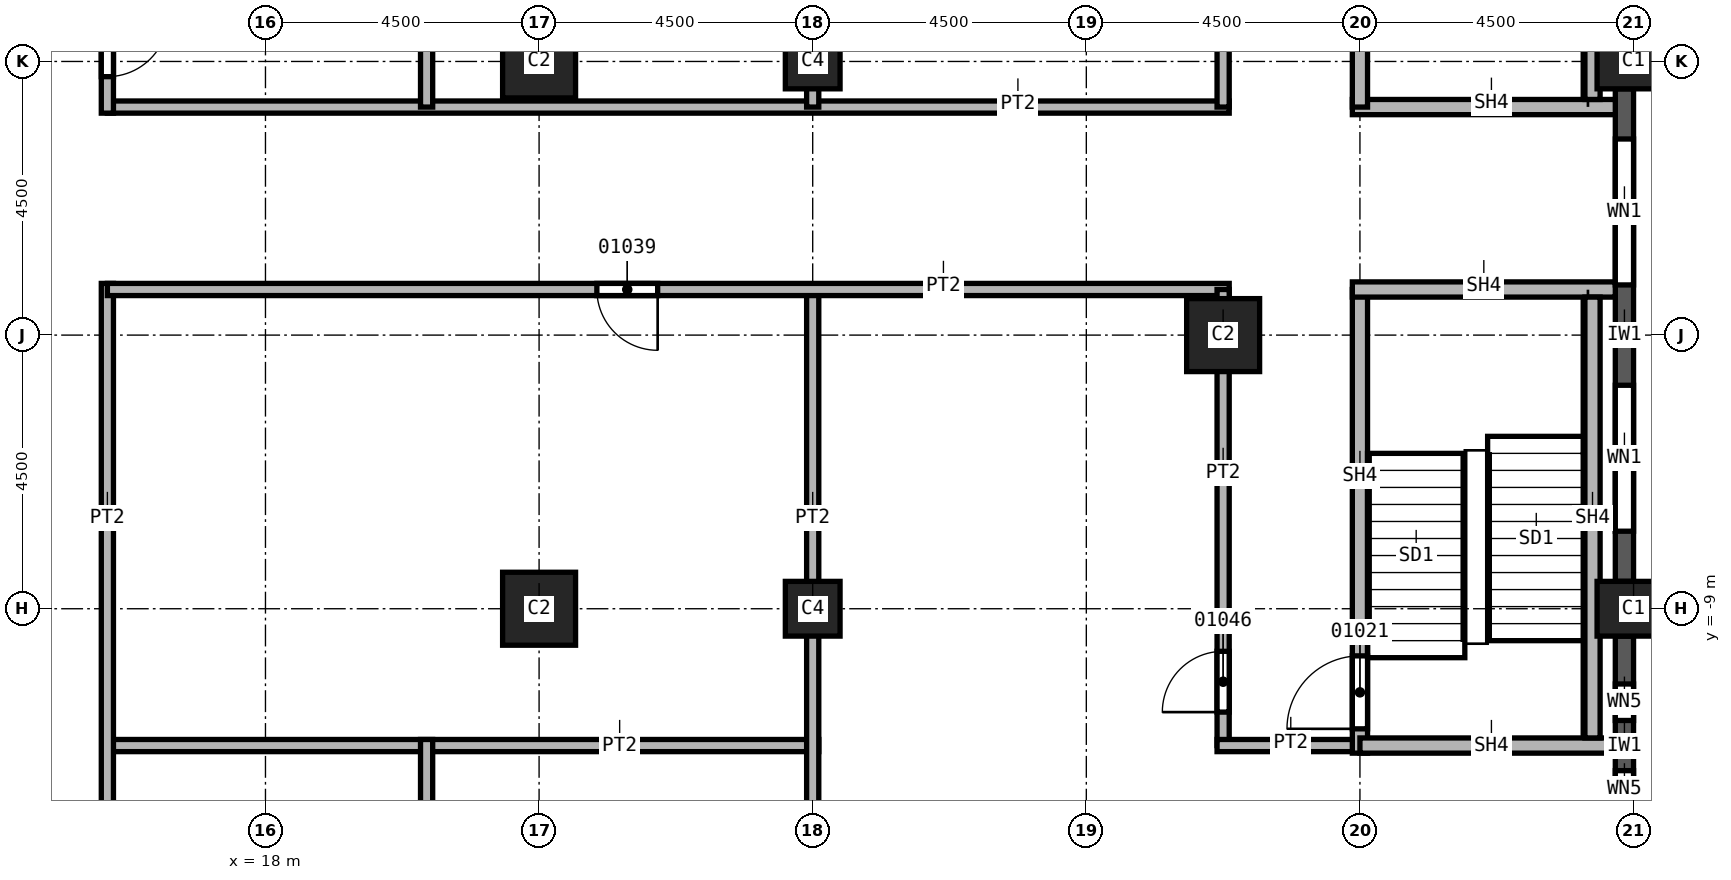
"""IFC4 building model, lengths in metres.
Left out: names, types, materials, properties, quantities, classifications, styles, units other than length and angle.
Written with IfcOpenShell. Run it as: python <this file> out.ifc"""

import sys

from ifc_helpers import new_model, si_unit, direction, frame, frame_2d, origin, origin_2d, place, context, subcontext, project, spatial, rectangle, extrude, element, fill, save


model = new_model("IFC4")
c1 = context("Model", 3, precision=1e-05, world=origin(), true_north=direction((0.0, 1.0)))
c2 = subcontext(c1, "Body", "Model", "MODEL_VIEW")
j1 = project(units=[si_unit("LENGTHUNIT", "METRE"), si_unit("PLANEANGLEUNIT", "RADIAN")], contexts=[c1])
p1 = place(None, origin())
s1 = spatial("IfcSite", under=j1, at=p1, CompositionType="ELEMENT")
p2 = place(p1, origin())
s2 = spatial("IfcBuilding", under=s1, at=p2, CompositionType="ELEMENT")
p3 = place(p2, frame((0.0, 0.0, 68.0)))
s3 = spatial("IfcBuildingStorey", under=s2, at=p3, CompositionType="ELEMENT", Elevation=68.0)
for number, where, z_axis, x_axis in (
    (1, (40.5, 0.0, 0.0), (0.0, 0.0, 1.0), (0.0, 1.0, 0.0)),
    (2, (40.5, -9.0, 0.0), (0.0, 0.0, 1.0), (0.0, 1.0, 0.0)),
):
    element("IfcColumn", number, at=place(p3, frame(where, z_axis=z_axis, x_axis=x_axis)), inside=s3, PredefinedType="COLUMN", context=c2, shape_type="SweptSolid", body=[
        extrude(rectangle(XDim=0.9, YDim=1.2, at=origin_2d()), origin(), (0.0, 0.0, 1.0), 3.7),
    ])
for number, where, z_axis, x_axis in (
    (3, (33.75, -4.5, 0.0), (0.0, 0.0, 1.0), (1.0, 0.0, 0.0)),
    (4, (22.5, 0.0, 0.0), (0.0, 0.0, 1.0), (1.0, 0.0, 0.0)),
    (5, (22.5, -9.0, 0.0), (0.0, 0.0, 1.0), (1.0, 0.0, 0.0)),
):
    element("IfcColumn", number, at=place(p3, frame(where, z_axis=z_axis, x_axis=x_axis)), inside=s3, PredefinedType="COLUMN", context=c2, shape_type="SweptSolid", body=[
        extrude(rectangle(XDim=1.2, YDim=1.2, at=origin_2d()), origin(), (0.0, 0.0, 1.0), 3.7),
    ])
for number, where, z_axis, x_axis in (
    (6, (27.0, 0.0, 0.0), (0.0, 0.0, 1.0), (1.0, 0.0, 0.0)),
    (7, (27.0, -9.0, 0.0), (0.0, 0.0, 1.0), (1.0, 0.0, 0.0)),
):
    element("IfcColumn", number, at=place(p3, frame(where, z_axis=z_axis, x_axis=x_axis)), inside=s3, PredefinedType="COLUMN", context=c2, shape_type="SweptSolid", body=[
        extrude(rectangle(XDim=0.9, YDim=0.9, at=origin_2d()), origin(), (0.0, 0.0, 1.0), 3.7),
    ])
p4 = place(p3, frame((40.35, -13.05, 0.0), z_axis=(0.0, 0.0, 1.0), x_axis=(0.0, 1.0, 0.0)))
e8 = element("IfcWall", 8, at=p4, inside=s3, PredefinedType="SOLIDWALL", context=c2, shape_type="SweptSolid", body=[
    extrude(rectangle(XDim=3.6, YDim=0.3, at=frame_2d((1.8, 0.0))), origin(), (0.0, 0.0, 1.0), 3.1),
])
p5 = place(p4, frame((0.788, 0.0, 0.8)))
e9 = element("IfcOpeningElement", 9, at=p5, cuts=e8, PredefinedType="OPENING", context=c2, shape_type="SweptSolid", body=[
    extrude(rectangle(XDim=0.6, YDim=1.95, at=frame_2d((0.3, 0.975))), frame((0.0, 0.15, 0.0), z_axis=(0.0, -1.0, 0.0), x_axis=(1.0, 0.0, 0.0)), (0.0, 0.0, 1.0), 0.3),
])
p6 = place(p4, frame((2.212, 0.0, 0.8)))
e10 = element("IfcOpeningElement", 10, at=p6, cuts=e8, PredefinedType="OPENING", context=c2, shape_type="SweptSolid", body=[
    extrude(rectangle(XDim=0.6, YDim=1.95, at=frame_2d((0.3, 0.975))), frame((0.0, 0.15, 0.0), z_axis=(0.0, -1.0, 0.0), x_axis=(1.0, 0.0, 0.0)), (0.0, 0.0, 1.0), 0.3),
])
p7 = place(p3, frame((40.35, -8.55, 0.0), z_axis=(0.0, 0.0, 1.0), x_axis=(0.0, 1.0, 0.0)))
e11 = element("IfcWall", 11, at=p7, inside=s3, PredefinedType="SOLIDWALL", context=c2, shape_type="SweptSolid", body=[
    extrude(rectangle(XDim=8.1, YDim=0.3, at=frame_2d((4.05, 0.0))), origin(), (0.0, 0.0, 1.0), 3.1),
])
p8 = place(p7, frame((0.825, 0.0, 0.8)))
e12 = element("IfcOpeningElement", 12, at=p8, cuts=e11, PredefinedType="OPENING", context=c2, shape_type="SweptSolid", body=[
    extrude(rectangle(XDim=2.4, YDim=1.95, at=frame_2d((1.2, 0.975))), frame((0.0, 0.15, 0.0), z_axis=(0.0, -1.0, 0.0), x_axis=(1.0, 0.0, 0.0)), (0.0, 0.0, 1.0), 0.3),
])
p9 = place(p7, frame((4.875, 0.0, 0.8)))
e13 = element("IfcOpeningElement", 13, at=p9, cuts=e11, PredefinedType="OPENING", context=c2, shape_type="SweptSolid", body=[
    extrude(rectangle(XDim=2.4, YDim=1.95, at=frame_2d((1.2, 0.975))), frame((0.0, 0.15, 0.0), z_axis=(0.0, -1.0, 0.0), x_axis=(1.0, 0.0, 0.0)), (0.0, 0.0, 1.0), 0.3),
])
p10 = place(p3, frame((15.4, -11.25, 0.0), z_axis=(0.0, 0.0, 1.0), x_axis=(1.0, 0.0, 0.0)))
e14 = element("IfcWall", 14, at=p10, inside=s3, PredefinedType="PARTITIONING", context=c2, shape_type="SweptSolid", body=[
    extrude(rectangle(XDim=11.7, YDim=0.2, at=frame_2d((5.85, 0.0))), origin(), (0.0, 0.0, 1.0), 3.7),
])
p11 = place(p3, frame((15.4, -3.65, 0.0), z_axis=(0.0, 0.0, 1.0), x_axis=(0.0, -1.0, 0.0)))
e15 = element("IfcWall", 15, at=p11, inside=s3, PredefinedType="PARTITIONING", context=c2, shape_type="SweptSolid", body=[
    extrude(rectangle(XDim=20.85, YDim=0.2, at=frame_2d((10.425, 0.0))), origin(), (0.0, 0.0, 1.0), 3.7),
])
p12 = place(p11, frame((12.7, 0.0, 0.0)))
e16 = element("IfcOpeningElement", 16, at=p12, cuts=e15, PredefinedType="OPENING", context=c2, shape_type="SweptSolid", body=[
    extrude(rectangle(XDim=1.0, YDim=2.1, at=frame_2d((0.5, 1.05))), frame((0.0, 0.1, 0.0), z_axis=(0.0, -1.0, 0.0), x_axis=(1.0, 0.0, 0.0)), (0.0, 0.0, 1.0), 0.2),
])
p13 = place(p3, frame((15.4, -0.75, 0.0), z_axis=(0.0, 0.0, 1.0), x_axis=(1.0, 0.0, 0.0)))
e17 = element("IfcWall", 17, at=p13, inside=s3, PredefinedType="PARTITIONING", context=c2, shape_type="SweptSolid", body=[
    extrude(rectangle(XDim=18.45, YDim=0.2, at=frame_2d((9.225, 0.0))), origin(), (0.0, 0.0, 1.0), 3.7),
])
p14 = place(p3, frame((15.4, 24.5, 0.0), z_axis=(0.0, 0.0, 1.0), x_axis=(0.0, -1.0, 0.0)))
e18 = element("IfcWall", 18, at=p14, inside=s3, PredefinedType="PARTITIONING", context=c2, shape_type="SweptSolid", body=[
    extrude(rectangle(XDim=25.35, YDim=0.2, at=frame_2d((12.675, 0.0))), origin(), (0.0, 0.0, 1.0), 3.7),
])
p15 = place(p14, frame((23.75, 0.0, 0.0)))
e19 = element("IfcOpeningElement", 19, at=p15, cuts=e18, PredefinedType="OPENING", context=c2, shape_type="SweptSolid", body=[
    extrude(rectangle(XDim=1.0, YDim=2.1, at=frame_2d((0.5, 1.05))), frame((0.0, 0.1, 0.0), z_axis=(0.0, -1.0, 0.0), x_axis=(1.0, 0.0, 0.0)), (0.0, 0.0, 1.0), 0.2),
])
p16 = place(p14, frame((12.5, 0.0, 0.0)))
e20 = element("IfcOpeningElement", 20, at=p16, cuts=e18, PredefinedType="OPENING", context=c2, shape_type="SweptSolid", body=[
    extrude(rectangle(XDim=1.0, YDim=2.1, at=frame_2d((0.5, 1.05))), frame((0.0, 0.1, 0.0), z_axis=(0.0, -1.0, 0.0), x_axis=(1.0, 0.0, 0.0)), (0.0, 0.0, 1.0), 0.2),
])
p17 = place(p14, frame((2.8, 0.0, 0.0)))
e21 = element("IfcOpeningElement", 21, at=p17, cuts=e18, PredefinedType="OPENING", context=c2, shape_type="SweptSolid", body=[
    extrude(rectangle(XDim=1.0, YDim=2.1, at=frame_2d((0.5, 1.05))), frame((0.0, 0.1, 0.0), z_axis=(0.0, -1.0, 0.0), x_axis=(1.0, 0.0, 0.0)), (0.0, 0.0, 1.0), 0.2),
])
p18 = place(p3, frame((20.65, -11.15, 0.0), z_axis=(0.0, 0.0, 1.0), x_axis=(0.0, -1.0, 0.0)))
e22 = element("IfcWall", 22, at=p18, inside=s3, PredefinedType="PARTITIONING", context=c2, shape_type="SweptSolid", body=[
    extrude(rectangle(XDim=13.35, YDim=0.2, at=frame_2d((6.675, 0.0))), origin(), (0.0, 0.0, 1.0), 3.7),
])
p19 = place(p18, frame((4.3, 0.0, 0.0)))
e23 = element("IfcOpeningElement", 23, at=p19, cuts=e22, PredefinedType="OPENING", context=c2, shape_type="SweptSolid", body=[
    extrude(rectangle(XDim=1.0, YDim=2.1, at=frame_2d((0.5, 1.05))), frame((0.0, 0.1, 0.0), z_axis=(0.0, -1.0, 0.0), x_axis=(1.0, 0.0, 0.0)), (0.0, 0.0, 1.0), 0.2),
])
p20 = place(p3, frame((20.65, 6.85, 0.0), z_axis=(0.0, 0.0, 1.0), x_axis=(0.0, -1.0, 0.0)))
e24 = element("IfcWall", 24, at=p20, inside=s3, PredefinedType="PARTITIONING", context=c2, shape_type="SweptSolid", body=[
    extrude(rectangle(XDim=7.6, YDim=0.2, at=frame_2d((3.8, 0.0))), origin(), (0.0, 0.0, 1.0), 3.7),
])
p21 = place(p20, frame((5.05, 0.0, 0.0)))
e25 = element("IfcOpeningElement", 25, at=p21, cuts=e24, PredefinedType="OPENING", context=c2, shape_type="SweptSolid", body=[
    extrude(rectangle(XDim=1.0, YDim=2.1, at=frame_2d((0.5, 1.05))), frame((0.0, 0.1, 0.0), z_axis=(0.0, -1.0, 0.0), x_axis=(1.0, 0.0, 0.0)), (0.0, 0.0, 1.0), 0.2),
])
p22 = place(p3, frame((27.0, -3.75, 0.0), z_axis=(0.0, 0.0, 1.0), x_axis=(0.0, -1.0, 0.0)))
e26 = element("IfcWall", 26, at=p22, inside=s3, PredefinedType="PARTITIONING", context=c2, shape_type="SweptSolid", body=[
    extrude(rectangle(XDim=13.65, YDim=0.2, at=frame_2d((6.825, 0.0))), origin(), (0.0, 0.0, 1.0), 3.7),
])
p23 = place(p3, frame((27.0, 17.4, 0.0), z_axis=(0.0, 0.0, 1.0), x_axis=(0.0, -1.0, 0.0)))
e27 = element("IfcWall", 27, at=p23, inside=s3, PredefinedType="PARTITIONING", context=c2, shape_type="SweptSolid", body=[
    extrude(rectangle(XDim=18.15, YDim=0.2, at=frame_2d((9.075, 0.0))), origin(), (0.0, 0.0, 1.0), 3.7),
])
p24 = place(p3, frame((33.85, -3.75, 0.0), z_axis=(0.0, 0.0, 1.0), x_axis=(-1.0, 0.0, 0.0)))
e28 = element("IfcWall", 28, at=p24, inside=s3, PredefinedType="PARTITIONING", context=c2, shape_type="SweptSolid", body=[
    extrude(rectangle(XDim=18.45, YDim=0.2, at=frame_2d((9.225, 0.0))), origin(), (0.0, 0.0, 1.0), 3.7),
])
p25 = place(p24, frame((9.4, 0.0, 0.0)))
e29 = element("IfcOpeningElement", 29, at=p25, cuts=e28, PredefinedType="OPENING", context=c2, shape_type="SweptSolid", body=[
    extrude(rectangle(XDim=1.0, YDim=2.1, at=frame_2d((0.5, 1.05))), frame((0.0, 0.1, 0.0), z_axis=(0.0, -1.0, 0.0), x_axis=(1.0, 0.0, 0.0)), (0.0, 0.0, 1.0), 0.2),
])
p26 = place(p3, frame((33.75, -11.25, 0.0), z_axis=(0.0, 0.0, 1.0), x_axis=(0.0, 1.0, 0.0)))
e30 = element("IfcWall", 30, at=p26, inside=s3, PredefinedType="PARTITIONING", context=c2, shape_type="SweptSolid", body=[
    extrude(rectangle(XDim=7.5, YDim=0.2, at=frame_2d((3.75, 0.0))), origin(), (0.0, 0.0, 1.0), 3.7),
])
p27 = place(p26, frame((0.55, 0.0, 0.0)))
e31 = element("IfcOpeningElement", 31, at=p27, cuts=e30, PredefinedType="OPENING", context=c2, shape_type="SweptSolid", body=[
    extrude(rectangle(XDim=1.0, YDim=2.1, at=frame_2d((0.5, 1.05))), frame((0.0, 0.1, 0.0), z_axis=(0.0, -1.0, 0.0), x_axis=(1.0, 0.0, 0.0)), (0.0, 0.0, 1.0), 0.2),
])
p28 = place(p3, frame((33.75, -0.75, 0.0), z_axis=(0.0, 0.0, 1.0), x_axis=(0.0, 1.0, 0.0)))
e32 = element("IfcWall", 32, at=p28, inside=s3, PredefinedType="PARTITIONING", context=c2, shape_type="SweptSolid", body=[
    extrude(rectangle(XDim=18.45, YDim=0.2, at=frame_2d((9.225, 0.0))), origin(), (0.0, 0.0, 1.0), 3.7),
])
p29 = place(p28, frame((2.35, 0.0, 0.0)))
e33 = element("IfcOpeningElement", 33, at=p29, cuts=e32, PredefinedType="OPENING", context=c2, shape_type="SweptSolid", body=[
    extrude(rectangle(XDim=1.0, YDim=2.1, at=frame_2d((0.5, 1.05))), frame((0.0, 0.1, 0.0), z_axis=(0.0, -1.0, 0.0), x_axis=(1.0, 0.0, 0.0)), (0.0, 0.0, 1.0), 0.2),
])
p30 = place(p3, frame((36.0, -11.25, 0.0), z_axis=(0.0, 0.0, 1.0), x_axis=(-1.0, 0.0, 0.0)))
e34 = element("IfcWall", 34, at=p30, inside=s3, PredefinedType="PARTITIONING", context=c2, shape_type="SweptSolid", body=[
    extrude(rectangle(XDim=2.35, YDim=0.2, at=frame_2d((1.175, 0.0))), origin(), (0.0, 0.0, 1.0), 3.7),
])
p31 = place(p3, frame((35.875, -0.75, 0.0), z_axis=(0.0, 0.0, 1.0), x_axis=(1.0, 0.0, 0.0)))
e35 = element("IfcWall", 35, at=p31, inside=s3, PredefinedType="SOLIDWALL", context=c2, shape_type="SweptSolid", body=[
    extrude(rectangle(XDim=4.325, YDim=0.25, at=frame_2d((2.163, 0.0))), origin(), (0.0, 0.0, 1.0), 3.7),
])
p32 = place(p3, frame((36.0, -11.375, 0.0), z_axis=(0.0, 0.0, 1.0), x_axis=(0.0, 1.0, 0.0)))
e36 = element("IfcWall", 36, at=p32, inside=s3, PredefinedType="SOLIDWALL", context=c2, shape_type="SweptSolid", body=[
    extrude(rectangle(XDim=7.625, YDim=0.25, at=frame_2d((3.812, 0.0))), origin(), (0.0, 0.0, 1.0), 3.7),
])
p33 = place(p32, frame((0.4, 0.0, 0.0)))
e37 = element("IfcOpeningElement", 37, at=p33, cuts=e36, PredefinedType="OPENING", context=c2, shape_type="SweptSolid", body=[
    extrude(rectangle(XDim=1.2, YDim=2.1, at=frame_2d((0.6, 1.05))), frame((0.0, 0.125, 0.0), z_axis=(0.0, -1.0, 0.0), x_axis=(1.0, 0.0, 0.0)), (0.0, 0.0, 1.0), 0.25),
])
p34 = place(p3, frame((36.0, -0.75, 0.0), z_axis=(0.0, 0.0, 1.0), x_axis=(0.0, 1.0, 0.0)))
e38 = element("IfcWall", 38, at=p34, inside=s3, PredefinedType="SOLIDWALL", context=c2, shape_type="SweptSolid", body=[
    extrude(rectangle(XDim=7.625, YDim=0.25, at=frame_2d((3.812, 0.0))), origin(), (0.0, 0.0, 1.0), 3.7),
])
p35 = place(p34, frame((5.95, 0.0, 0.0)))
e39 = element("IfcOpeningElement", 39, at=p35, cuts=e38, PredefinedType="OPENING", context=c2, shape_type="SweptSolid", body=[
    extrude(rectangle(XDim=1.2, YDim=2.1, at=frame_2d((0.6, 1.05))), frame((0.0, 0.125, 0.0), z_axis=(0.0, -1.0, 0.0), x_axis=(1.0, 0.0, 0.0)), (0.0, 0.0, 1.0), 0.25),
])
p36 = place(p3, frame((40.2, -11.25, 0.0), z_axis=(0.0, 0.0, 1.0), x_axis=(-1.0, 0.0, 0.0)))
e40 = element("IfcWall", 40, at=p36, inside=s3, PredefinedType="SOLIDWALL", context=c2, shape_type="SweptSolid", body=[
    extrude(rectangle(XDim=4.2, YDim=0.25, at=frame_2d((2.1, 0.0))), origin(), (0.0, 0.0, 1.0), 3.7),
])
p37 = place(p3, frame((40.2, -3.75, 0.0), z_axis=(0.0, 0.0, 1.0), x_axis=(-1.0, 0.0, 0.0)))
e41 = element("IfcWall", 41, at=p37, inside=s3, PredefinedType="SOLIDWALL", context=c2, shape_type="SweptSolid", body=[
    extrude(rectangle(XDim=4.325, YDim=0.25, at=frame_2d((2.163, 0.0))), origin(), (0.0, 0.0, 1.0), 3.7),
])
for number, where, z_axis, x_axis in (
    (42, (39.825, -11.125, 0.0), (0.0, 0.0, 1.0), (0.0, 1.0, 0.0)),
    (43, (39.825, -0.625, 0.0), (0.0, 0.0, 1.0), (0.0, 1.0, 0.0)),
):
    element("IfcWall", number, at=place(p3, frame(where, z_axis=z_axis, x_axis=x_axis)), inside=s3, PredefinedType="SOLIDWALL", context=c2, shape_type="SweptSolid", body=[
        extrude(rectangle(XDim=7.25, YDim=0.25, at=frame_2d((3.625, 0.0))), origin(), (0.0, 0.0, 1.0), 3.7),
    ])
p38 = place(p8, origin())
e44 = element("IfcWindow", 44, at=p38, inside=s3, PartitioningType="SINGLE_PANEL", PredefinedType="WINDOW", context=c2, shape_type="SweptSolid", body=[
    extrude(rectangle(XDim=2.4, YDim=1.95, at=frame_2d((1.2, 0.975))), frame((0.0, 0.03, 0.0), z_axis=(0.0, -1.0, 0.0), x_axis=(1.0, 0.0, 0.0)), (0.0, 0.0, 1.0), 0.06),
])
fill(e12, e44)
p39 = place(p9, origin())
e45 = element("IfcWindow", 45, at=p39, inside=s3, PartitioningType="SINGLE_PANEL", PredefinedType="WINDOW", context=c2, shape_type="SweptSolid", body=[
    extrude(rectangle(XDim=2.4, YDim=1.95, at=frame_2d((1.2, 0.975))), frame((0.0, 0.03, 0.0), z_axis=(0.0, -1.0, 0.0), x_axis=(1.0, 0.0, 0.0)), (0.0, 0.0, 1.0), 0.06),
])
fill(e13, e45)
p40 = place(p33, origin())
e46 = element("IfcDoor", 46, at=p40, inside=s3, OperationType="SINGLE_SWING_RIGHT", PredefinedType="DOOR", context=c2, shape_type="SweptSolid", body=[
    extrude(rectangle(XDim=1.2, YDim=2.1, at=frame_2d((0.6, 1.05))), frame((0.0, 0.025, 0.0), z_axis=(0.0, -1.0, 0.0), x_axis=(1.0, 0.0, 0.0)), (0.0, 0.0, 1.0), 0.05),
])
fill(e37, e46)
p41 = place(p15, origin())
e47 = element("IfcDoor", 47, at=p41, inside=s3, OperationType="SINGLE_SWING_RIGHT", PredefinedType="DOOR", context=c2, shape_type="SweptSolid", body=[
    extrude(rectangle(XDim=1.0, YDim=2.1, at=frame_2d((0.5, 1.05))), frame((0.0, 0.025, 0.0), z_axis=(0.0, -1.0, 0.0), x_axis=(1.0, 0.0, 0.0)), (0.0, 0.0, 1.0), 0.05),
])
fill(e19, e47)
p42 = place(p25, origin())
e48 = element("IfcDoor", 48, at=p42, inside=s3, OperationType="SINGLE_SWING_RIGHT", PredefinedType="DOOR", context=c2, shape_type="SweptSolid", body=[
    extrude(rectangle(XDim=1.0, YDim=2.1, at=frame_2d((0.5, 1.05))), frame((0.0, 0.025, 0.0), z_axis=(0.0, -1.0, 0.0), x_axis=(1.0, 0.0, 0.0)), (0.0, 0.0, 1.0), 0.05),
])
fill(e29, e48)
p43 = place(p27, origin())
e49 = element("IfcDoor", 49, at=p43, inside=s3, OperationType="SINGLE_SWING_LEFT", PredefinedType="DOOR", context=c2, shape_type="SweptSolid", body=[
    extrude(rectangle(XDim=1.0, YDim=2.1, at=frame_2d((0.5, 1.05))), frame((0.0, 0.025, 0.0), z_axis=(0.0, -1.0, 0.0), x_axis=(1.0, 0.0, 0.0)), (0.0, 0.0, 1.0), 0.05),
])
fill(e31, e49)
p44 = place(p5, origin())
e50 = element("IfcWindow", 50, at=p44, inside=s3, PartitioningType="SINGLE_PANEL", PredefinedType="WINDOW", context=c2, shape_type="SweptSolid", body=[
    extrude(rectangle(XDim=0.6, YDim=1.95, at=frame_2d((0.3, 0.975))), frame((0.0, 0.03, 0.0), z_axis=(0.0, -1.0, 0.0), x_axis=(1.0, 0.0, 0.0)), (0.0, 0.0, 1.0), 0.06),
])
fill(e9, e50)
p45 = place(p6, origin())
e51 = element("IfcWindow", 51, at=p45, inside=s3, PartitioningType="SINGLE_PANEL", PredefinedType="WINDOW", context=c2, shape_type="SweptSolid", body=[
    extrude(rectangle(XDim=0.6, YDim=1.95, at=frame_2d((0.3, 0.975))), frame((0.0, 0.03, 0.0), z_axis=(0.0, -1.0, 0.0), x_axis=(1.0, 0.0, 0.0)), (0.0, 0.0, 1.0), 0.06),
])
fill(e10, e51)
save(model, sys.argv[1])
